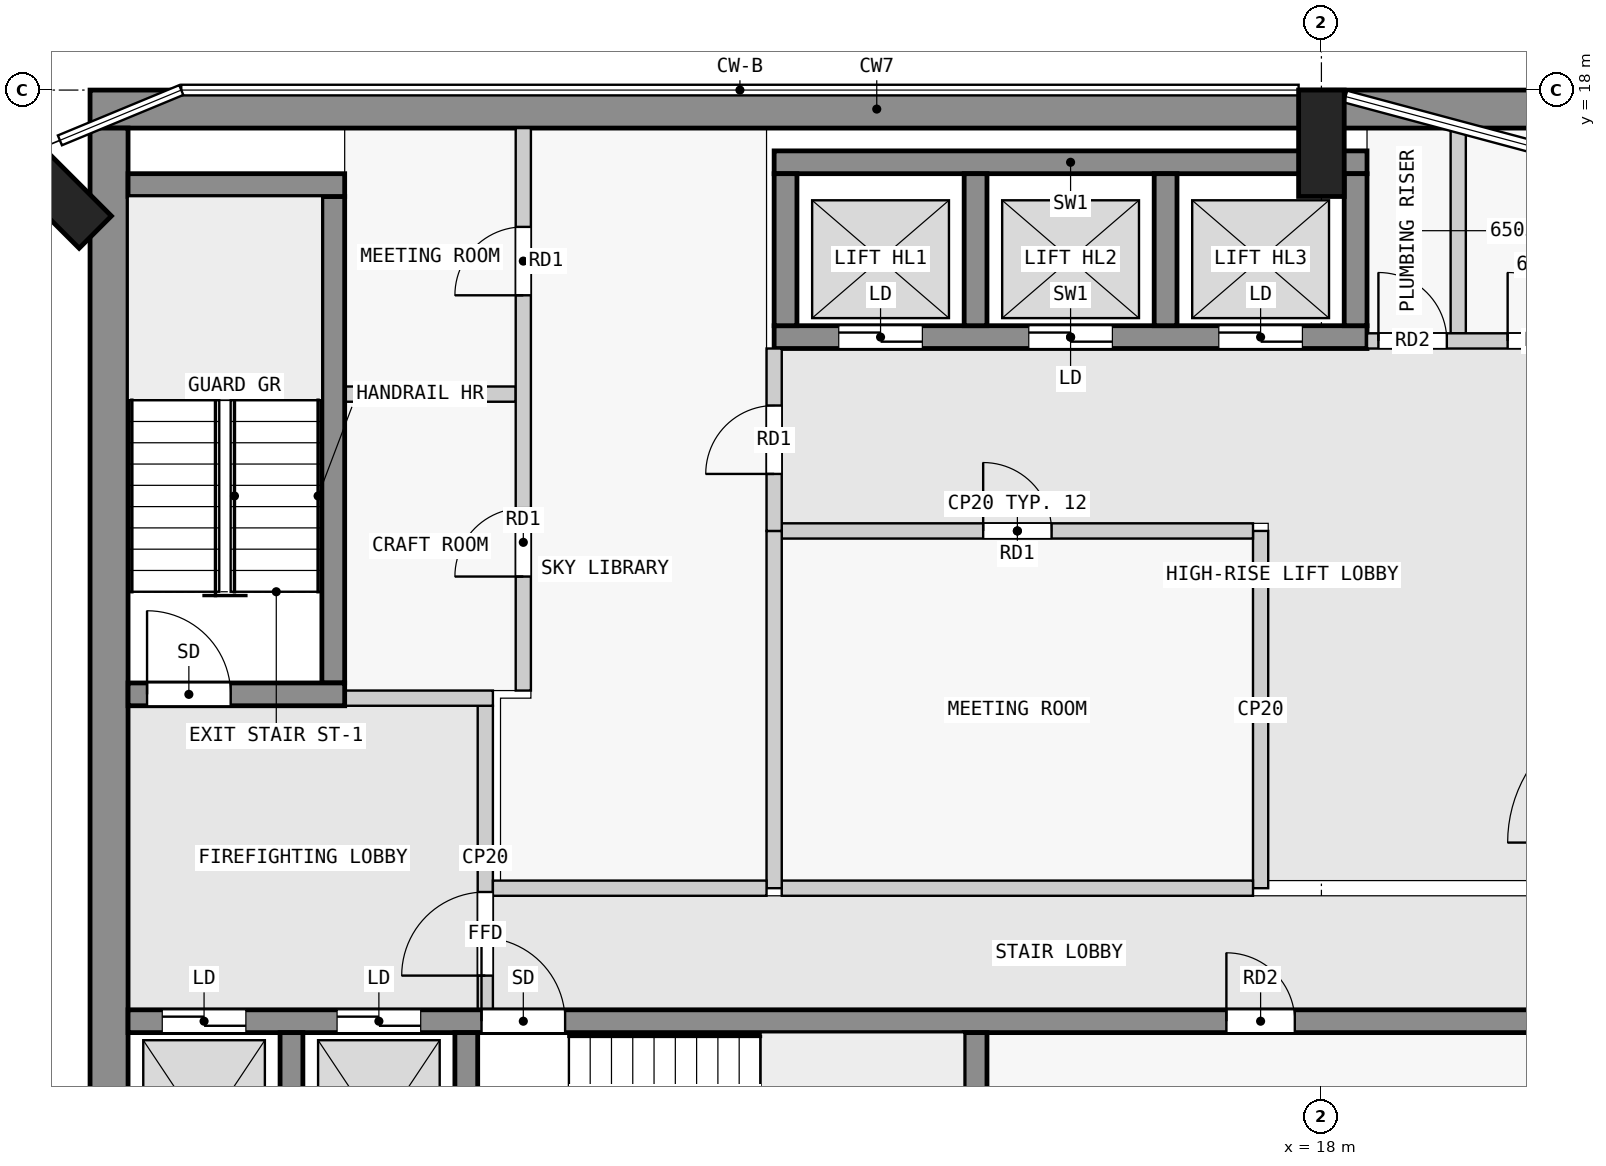
"""IFC4 building model, lengths in metres.
Left out: names, types, materials, properties, quantities, classifications, styles, units other than length and angle.
Written with IfcOpenShell. Run it as: python <this file> out.ifc"""

import sys

from ifc_helpers import new_model, si_unit, direction, frame, frame_2d, origin, origin_2d, place, context, subcontext, project, spatial, rectangle, extrude, element, fill, save


model = new_model("IFC4")
c1 = context("Model", 3, precision=1e-05, world=origin(), true_north=direction((0.0, 1.0)))
c2 = subcontext(c1, "Body", "Model", "MODEL_VIEW")
j1 = project(units=[si_unit("LENGTHUNIT", "METRE"), si_unit("PLANEANGLEUNIT", "RADIAN")], contexts=[c1])
p1 = place(None, origin())
s1 = spatial("IfcSite", under=j1, at=p1, CompositionType="ELEMENT")
p2 = place(p1, origin())
s2 = spatial("IfcBuilding", under=s1, at=p2, CompositionType="ELEMENT")
p3 = place(p2, frame((0.0, 0.0, 249.4)))
s3 = spatial("IfcBuildingStorey", under=s2, at=p3, CompositionType="ELEMENT", Elevation=249.4)
for number, where, z_axis, x_axis in (
    (1, (18.0, 17.3, 0.0), (0.0, 0.0, 1.0), (1.0, 0.0, 0.0)),
    (2, (1.374, 16.626, 0.0), (0.0, 0.0, 1.0), (0.707, 0.707, 0.0)),
):
    element("IfcColumn", number, at=place(p3, frame(where, z_axis=z_axis, x_axis=x_axis)), inside=s3, PredefinedType="COLUMN", context=c2, shape_type="SweptSolid", body=[
        extrude(rectangle(XDim=0.6, YDim=1.4, at=origin_2d()), origin(), (0.0, 0.0, 1.0), 3.5),
    ])
p4 = place(p3, frame((1.8, 17.75, 0.0), z_axis=(0.0, 0.0, 1.0), x_axis=(1.0, 0.0, 0.0)))
e3 = element("IfcWall", 3, at=p4, inside=s3, PredefinedType="SHEAR", context=c2, shape_type="SweptSolid", body=[
    extrude(rectangle(XDim=20.7, YDim=0.5, at=frame_2d((10.35, 0.0))), origin(), (0.0, 0.0, 1.0), 3.25),
])
p5 = place(p3, frame((2.05, 2.5, 0.0), z_axis=(0.0, 0.0, 1.0), x_axis=(0.0, 1.0, 0.0)))
e4 = element("IfcWall", 4, at=p5, inside=s3, PredefinedType="SHEAR", context=c2, shape_type="SweptSolid", body=[
    extrude(rectangle(XDim=15.0, YDim=0.5, at=frame_2d((7.5, 0.0))), origin(), (0.0, 0.0, 1.0), 3.25),
])
for number, where, z_axis, x_axis in (
    (5, (4.45, 2.8, 0.0), (0.0, 0.0, 1.0), (0.0, 1.0, 0.0)),
    (6, (6.75, 2.8, 0.0), (0.0, 0.0, 1.0), (0.0, 1.0, 0.0)),
    (7, (13.45, 2.8, 0.0), (0.0, 0.0, 1.0), (0.0, 1.0, 0.0)),
):
    element("IfcWall", number, at=place(p3, frame(where, z_axis=z_axis, x_axis=x_axis)), inside=s3, PredefinedType="SHEAR", context=c2, shape_type="SweptSolid", body=[
        extrude(rectangle(XDim=2.8, YDim=0.3, at=frame_2d((1.4, 0.0))), origin(), (0.0, 0.0, 1.0), 3.25),
    ])
p6 = place(p3, frame((2.3, 5.75, 0.0), z_axis=(0.0, 0.0, 1.0), x_axis=(1.0, 0.0, 0.0)))
e8 = element("IfcWall", 8, at=p6, inside=s3, PredefinedType="SHEAR", context=c2, shape_type="SweptSolid", body=[
    extrude(rectangle(XDim=18.8, YDim=0.3, at=frame_2d((9.4, 0.0))), origin(), (0.0, 0.0, 1.0), 3.25),
])
p7 = place(p6, frame((4.65, 0.0, 0.0)))
e9 = element("IfcOpeningElement", 9, at=p7, cuts=e8, PredefinedType="OPENING", context=c2, shape_type="SweptSolid", body=[
    extrude(rectangle(XDim=1.1, YDim=2.1, at=frame_2d((0.55, 1.05))), frame((0.0, 0.16, 0.0), z_axis=(0.0, -1.0, 0.0), x_axis=(1.0, 0.0, 0.0)), (0.0, 0.0, 1.0), 0.32),
])
p8 = place(p6, frame((0.45, 0.0, 0.0)))
e10 = element("IfcOpeningElement", 10, at=p8, cuts=e8, PredefinedType="OPENING", context=c2, shape_type="SweptSolid", body=[
    extrude(rectangle(XDim=1.1, YDim=2.1, at=frame_2d((0.55, 1.05))), frame((0.0, 0.16, 0.0), z_axis=(0.0, -1.0, 0.0), x_axis=(1.0, 0.0, 0.0)), (0.0, 0.0, 1.0), 0.32),
])
p9 = place(p6, frame((2.75, 0.0, 0.0)))
e11 = element("IfcOpeningElement", 11, at=p9, cuts=e8, PredefinedType="OPENING", context=c2, shape_type="SweptSolid", body=[
    extrude(rectangle(XDim=1.1, YDim=2.1, at=frame_2d((0.55, 1.05))), frame((0.0, 0.16, 0.0), z_axis=(0.0, -1.0, 0.0), x_axis=(1.0, 0.0, 0.0)), (0.0, 0.0, 1.0), 0.32),
])
p10 = place(p6, frame((14.45, 0.0, 0.0)))
e12 = element("IfcOpeningElement", 12, at=p10, cuts=e8, PredefinedType="OPENING", context=c2, shape_type="SweptSolid", body=[
    extrude(rectangle(XDim=0.9, YDim=2.1, at=frame_2d((0.45, 1.05))), frame((0.0, 0.16, 0.0), z_axis=(0.0, -1.0, 0.0), x_axis=(1.0, 0.0, 0.0)), (0.0, 0.0, 1.0), 0.32),
])
p11 = place(p3, frame((2.3, 10.05, 0.0), z_axis=(0.0, 0.0, 1.0), x_axis=(1.0, 0.0, 0.0)))
e13 = element("IfcWall", 13, at=p11, inside=s3, PredefinedType="SHEAR", context=c2, shape_type="SweptSolid", body=[
    extrude(rectangle(XDim=2.85, YDim=0.3, at=frame_2d((1.425, 0.0))), origin(), (0.0, 0.0, 1.0), 3.25),
])
p12 = place(p11, frame((0.25, 0.0, 0.0)))
e14 = element("IfcOpeningElement", 14, at=p12, cuts=e13, PredefinedType="OPENING", context=c2, shape_type="SweptSolid", body=[
    extrude(rectangle(XDim=1.1, YDim=2.1, at=frame_2d((0.55, 1.05))), frame((0.0, 0.16, 0.0), z_axis=(0.0, -1.0, 0.0), x_axis=(1.0, 0.0, 0.0)), (0.0, 0.0, 1.0), 0.32),
])
p13 = place(p3, frame((5.0, 10.2, 0.0), z_axis=(0.0, 0.0, 1.0), x_axis=(0.0, 1.0, 0.0)))
e15 = element("IfcWall", 15, at=p13, inside=s3, PredefinedType="SHEAR", context=c2, shape_type="SweptSolid", body=[
    extrude(rectangle(XDim=6.4, YDim=0.3, at=frame_2d((3.2, 0.0))), origin(), (0.0, 0.0, 1.0), 3.25),
])
p14 = place(p3, frame((2.3, 16.75, 0.0), z_axis=(0.0, 0.0, 1.0), x_axis=(1.0, 0.0, 0.0)))
e16 = element("IfcWall", 16, at=p14, inside=s3, PredefinedType="SHEAR", context=c2, shape_type="SweptSolid", body=[
    extrude(rectangle(XDim=2.85, YDim=0.3, at=frame_2d((1.425, 0.0))), origin(), (0.0, 0.0, 1.0), 3.25),
])
p15 = place(p3, frame((10.8, 17.05, 0.0), z_axis=(0.0, 0.0, 1.0), x_axis=(1.0, 0.0, 0.0)))
e17 = element("IfcWall", 17, at=p15, inside=s3, PredefinedType="SHEAR", context=c2, shape_type="SweptSolid", body=[
    extrude(rectangle(XDim=7.8, YDim=0.3, at=frame_2d((3.9, 0.0))), origin(), (0.0, 0.0, 1.0), 3.25),
])
p16 = place(p3, frame((10.8, 14.75, 0.0), z_axis=(0.0, 0.0, 1.0), x_axis=(1.0, 0.0, 0.0)))
e18 = element("IfcWall", 18, at=p16, inside=s3, PredefinedType="SHEAR", context=c2, shape_type="SweptSolid", body=[
    extrude(rectangle(XDim=7.8, YDim=0.3, at=frame_2d((3.9, 0.0))), origin(), (0.0, 0.0, 1.0), 3.25),
])
p17 = place(p16, frame((0.85, 0.0, 0.0)))
e19 = element("IfcOpeningElement", 19, at=p17, cuts=e18, PredefinedType="OPENING", context=c2, shape_type="SweptSolid", body=[
    extrude(rectangle(XDim=1.1, YDim=2.1, at=frame_2d((0.55, 1.05))), frame((0.0, 0.16, 0.0), z_axis=(0.0, -1.0, 0.0), x_axis=(1.0, 0.0, 0.0)), (0.0, 0.0, 1.0), 0.32),
])
p18 = place(p16, frame((3.35, 0.0, 0.0)))
e20 = element("IfcOpeningElement", 20, at=p18, cuts=e18, PredefinedType="OPENING", context=c2, shape_type="SweptSolid", body=[
    extrude(rectangle(XDim=1.1, YDim=2.1, at=frame_2d((0.55, 1.05))), frame((0.0, 0.16, 0.0), z_axis=(0.0, -1.0, 0.0), x_axis=(1.0, 0.0, 0.0)), (0.0, 0.0, 1.0), 0.32),
])
p19 = place(p16, frame((5.85, 0.0, 0.0)))
e21 = element("IfcOpeningElement", 21, at=p19, cuts=e18, PredefinedType="OPENING", context=c2, shape_type="SweptSolid", body=[
    extrude(rectangle(XDim=1.1, YDim=2.1, at=frame_2d((0.55, 1.05))), frame((0.0, 0.16, 0.0), z_axis=(0.0, -1.0, 0.0), x_axis=(1.0, 0.0, 0.0)), (0.0, 0.0, 1.0), 0.32),
])
for number, where, z_axis, x_axis in (
    (22, (10.95, 14.9, 0.0), (0.0, 0.0, 1.0), (0.0, 1.0, 0.0)),
    (23, (13.45, 14.9, 0.0), (0.0, 0.0, 1.0), (0.0, 1.0, 0.0)),
    (24, (15.95, 14.9, 0.0), (0.0, 0.0, 1.0), (0.0, 1.0, 0.0)),
    (25, (18.45, 14.9, 0.0), (0.0, 0.0, 1.0), (0.0, 1.0, 0.0)),
):
    element("IfcWall", number, at=place(p3, frame(where, z_axis=z_axis, x_axis=x_axis)), inside=s3, PredefinedType="SHEAR", context=c2, shape_type="SweptSolid", body=[
        extrude(rectangle(XDim=2.0, YDim=0.3, at=frame_2d((1.0, 0.0))), origin(), (0.0, 0.0, 1.0), 3.25),
    ])
p20 = place(p3, frame((7.0, 5.9, 0.0), z_axis=(0.0, 0.0, 1.0), x_axis=(0.0, 1.0, 0.0)))
e26 = element("IfcWall", 26, at=p20, inside=s3, PredefinedType="PARTITIONING", context=c2, shape_type="SweptSolid", body=[
    extrude(rectangle(XDim=4.0, YDim=0.2, at=frame_2d((2.0, 0.0))), origin(), (0.0, 0.0, 1.0), 3.25),
])
p21 = place(p20, frame((0.45, 0.0, 0.0)))
e27 = element("IfcOpeningElement", 27, at=p21, cuts=e26, PredefinedType="OPENING", context=c2, shape_type="SweptSolid", body=[
    extrude(rectangle(XDim=1.1, YDim=2.1, at=frame_2d((0.55, 1.05))), frame((0.0, 0.11, 0.0), z_axis=(0.0, -1.0, 0.0), x_axis=(1.0, 0.0, 0.0)), (0.0, 0.0, 1.0), 0.22),
])
p22 = place(p3, frame((5.15, 10.0, 0.0), z_axis=(0.0, 0.0, 1.0), x_axis=(1.0, 0.0, 0.0)))
e28 = element("IfcWall", 28, at=p22, inside=s3, PredefinedType="PARTITIONING", context=c2, shape_type="SweptSolid", body=[
    extrude(rectangle(XDim=1.95, YDim=0.2, at=frame_2d((0.975, 0.0))), origin(), (0.0, 0.0, 1.0), 3.25),
])
p23 = place(p3, frame((7.1, 7.5, 0.0), z_axis=(0.0, 0.0, 1.0), x_axis=(1.0, 0.0, 0.0)))
e29 = element("IfcWall", 29, at=p23, inside=s3, PredefinedType="PARTITIONING", context=c2, shape_type="SweptSolid", body=[
    extrude(rectangle(XDim=3.6, YDim=0.2, at=frame_2d((1.8, 0.0))), origin(), (0.0, 0.0, 1.0), 3.25),
])
p24 = place(p3, frame((10.8, 12.2, 0.0), z_axis=(0.0, 0.0, 1.0), x_axis=(0.0, 1.0, 0.0)))
e30 = element("IfcWall", 30, at=p24, inside=s3, PredefinedType="PARTITIONING", context=c2, shape_type="SweptSolid", body=[
    extrude(rectangle(XDim=2.4, YDim=0.2, at=frame_2d((1.2, 0.0))), origin(), (0.0, 0.0, 1.0), 3.25),
])
p25 = place(p24, frame((0.75, 0.0, 0.0)))
e31 = element("IfcOpeningElement", 31, at=p25, cuts=e30, PredefinedType="OPENING", context=c2, shape_type="SweptSolid", body=[
    extrude(rectangle(XDim=0.9, YDim=2.1, at=frame_2d((0.45, 1.05))), frame((0.0, 0.11, 0.0), z_axis=(0.0, -1.0, 0.0), x_axis=(1.0, 0.0, 0.0)), (0.0, 0.0, 1.0), 0.22),
])
p26 = place(p3, frame((10.8, 7.5, 0.0), z_axis=(0.0, 0.0, 1.0), x_axis=(0.0, 1.0, 0.0)))
e32 = element("IfcWall", 32, at=p26, inside=s3, PredefinedType="PARTITIONING", context=c2, shape_type="SweptSolid", body=[
    extrude(rectangle(XDim=4.7, YDim=0.2, at=frame_2d((2.35, 0.0))), origin(), (0.0, 0.0, 1.0), 3.25),
])
p27 = place(p3, frame((10.9, 7.5, 0.0), z_axis=(0.0, 0.0, 1.0), x_axis=(1.0, 0.0, 0.0)))
e33 = element("IfcWall", 33, at=p27, inside=s3, PredefinedType="PARTITIONING", context=c2, shape_type="SweptSolid", body=[
    extrude(rectangle(XDim=6.2, YDim=0.2, at=frame_2d((3.1, 0.0))), origin(), (0.0, 0.0, 1.0), 3.25),
])
p28 = place(p3, frame((17.2, 7.5, 0.0), z_axis=(0.0, 0.0, 1.0), x_axis=(0.0, 1.0, 0.0)))
e34 = element("IfcWall", 34, at=p28, inside=s3, PredefinedType="PARTITIONING", context=c2, shape_type="SweptSolid", body=[
    extrude(rectangle(XDim=4.7, YDim=0.2, at=frame_2d((2.35, 0.0))), origin(), (0.0, 0.0, 1.0), 3.25),
])
p29 = place(p3, frame((10.9, 12.2, 0.0), z_axis=(0.0, 0.0, 1.0), x_axis=(1.0, 0.0, 0.0)))
e35 = element("IfcWall", 35, at=p29, inside=s3, PredefinedType="PARTITIONING", context=c2, shape_type="SweptSolid", body=[
    extrude(rectangle(XDim=6.2, YDim=0.2, at=frame_2d((3.1, 0.0))), origin(), (0.0, 0.0, 1.0), 3.25),
])
p30 = place(p29, frame((2.65, 0.0, 0.0)))
e36 = element("IfcOpeningElement", 36, at=p30, cuts=e35, PredefinedType="OPENING", context=c2, shape_type="SweptSolid", body=[
    extrude(rectangle(XDim=0.9, YDim=2.1, at=frame_2d((0.45, 1.05))), frame((0.0, 0.11, 0.0), z_axis=(0.0, -1.0, 0.0), x_axis=(1.0, 0.0, 0.0)), (0.0, 0.0, 1.0), 0.22),
])
p31 = place(p3, frame((7.5, 10.1, 0.0), z_axis=(0.0, 0.0, 1.0), x_axis=(0.0, 1.0, 0.0)))
e37 = element("IfcWall", 37, at=p31, inside=s3, PredefinedType="PARTITIONING", context=c2, shape_type="SweptSolid", body=[
    extrude(rectangle(XDim=7.4, YDim=0.2, at=frame_2d((3.7, 0.0))), origin(), (0.0, 0.0, 1.0), 3.25),
])
p32 = place(p31, frame((1.5, 0.0, 0.0)))
e38 = element("IfcOpeningElement", 38, at=p32, cuts=e37, PredefinedType="OPENING", context=c2, shape_type="SweptSolid", body=[
    extrude(rectangle(XDim=0.9, YDim=2.1, at=frame_2d((0.45, 1.05))), frame((0.0, 0.11, 0.0), z_axis=(0.0, -1.0, 0.0), x_axis=(1.0, 0.0, 0.0)), (0.0, 0.0, 1.0), 0.22),
])
p33 = place(p31, frame((5.2, 0.0, 0.0)))
e39 = element("IfcOpeningElement", 39, at=p33, cuts=e37, PredefinedType="OPENING", context=c2, shape_type="SweptSolid", body=[
    extrude(rectangle(XDim=0.9, YDim=2.1, at=frame_2d((0.45, 1.05))), frame((0.0, 0.11, 0.0), z_axis=(0.0, -1.0, 0.0), x_axis=(1.0, 0.0, 0.0)), (0.0, 0.0, 1.0), 0.22),
])
p34 = place(p3, frame((5.15, 14.0, 0.0), z_axis=(0.0, 0.0, 1.0), x_axis=(1.0, 0.0, 0.0)))
e40 = element("IfcWall", 40, at=p34, inside=s3, PredefinedType="PARTITIONING", context=c2, shape_type="SweptSolid", body=[
    extrude(rectangle(XDim=2.25, YDim=0.2, at=frame_2d((1.125, 0.0))), origin(), (0.0, 0.0, 1.0), 3.25),
])
p35 = place(p3, frame((18.6, 14.7, 0.0), z_axis=(0.0, 0.0, 1.0), x_axis=(1.0, 0.0, 0.0)))
e41 = element("IfcWall", 41, at=p35, inside=s3, PredefinedType="PARTITIONING", context=c2, shape_type="SweptSolid", body=[
    extrude(rectangle(XDim=3.4, YDim=0.2, at=frame_2d((1.7, 0.0))), origin(), (0.0, 0.0, 1.0), 3.25),
])
p36 = place(p35, frame((0.15, 0.0, 0.0)))
e42 = element("IfcOpeningElement", 42, at=p36, cuts=e41, PredefinedType="OPENING", context=c2, shape_type="SweptSolid", body=[
    extrude(rectangle(XDim=0.9, YDim=2.1, at=frame_2d((0.45, 1.05))), frame((0.0, 0.11, 0.0), z_axis=(0.0, -1.0, 0.0), x_axis=(1.0, 0.0, 0.0)), (0.0, 0.0, 1.0), 0.22),
])
p37 = place(p35, frame((1.85, 0.0, 0.0)))
e43 = element("IfcOpeningElement", 43, at=p37, cuts=e41, PredefinedType="OPENING", context=c2, shape_type="SweptSolid", body=[
    extrude(rectangle(XDim=0.9, YDim=2.1, at=frame_2d((0.45, 1.05))), frame((0.0, 0.11, 0.0), z_axis=(0.0, -1.0, 0.0), x_axis=(1.0, 0.0, 0.0)), (0.0, 0.0, 1.0), 0.22),
])
p38 = place(p3, frame((19.8, 14.8, 0.0), z_axis=(0.0, 0.0, 1.0), x_axis=(0.0, 1.0, 0.0)))
e44 = element("IfcWall", 44, at=p38, inside=s3, PredefinedType="PARTITIONING", context=c2, shape_type="SweptSolid", body=[
    extrude(rectangle(XDim=2.7, YDim=0.2, at=frame_2d((1.35, 0.0))), origin(), (0.0, 0.0, 1.0), 3.25),
])
p39 = place(p21, origin())
e45 = element("IfcDoor", 45, at=p39, inside=s3, OperationType="SINGLE_SWING_LEFT", PredefinedType="DOOR", context=c2, shape_type="SweptSolid", body=[
    extrude(rectangle(XDim=1.1, YDim=2.1, at=frame_2d((0.55, 1.05))), frame((0.0, 0.025, 0.0), z_axis=(0.0, -1.0, 0.0), x_axis=(1.0, 0.0, 0.0)), (0.0, 0.0, 1.0), 0.05),
])
fill(e27, e45)
p40 = place(p12, origin())
e46 = element("IfcDoor", 46, at=p40, inside=s3, OperationType="SINGLE_SWING_RIGHT", PredefinedType="DOOR", context=c2, shape_type="SweptSolid", body=[
    extrude(rectangle(XDim=1.1, YDim=2.1, at=frame_2d((0.55, 1.05))), frame((0.0, 0.025, 0.0), z_axis=(0.0, -1.0, 0.0), x_axis=(1.0, 0.0, 0.0)), (0.0, 0.0, 1.0), 0.05),
])
fill(e14, e46)
p41 = place(p25, origin())
e47 = element("IfcDoor", 47, at=p41, inside=s3, OperationType="SINGLE_SWING_LEFT", PredefinedType="DOOR", context=c2, shape_type="SweptSolid", body=[
    extrude(rectangle(XDim=0.9, YDim=2.1, at=frame_2d((0.45, 1.05))), frame((0.0, 0.025, 0.0), z_axis=(0.0, -1.0, 0.0), x_axis=(1.0, 0.0, 0.0)), (0.0, 0.0, 1.0), 0.05),
])
fill(e31, e47)
p42 = place(p30, origin())
e48 = element("IfcDoor", 48, at=p42, inside=s3, OperationType="SINGLE_SWING_LEFT", PredefinedType="DOOR", context=c2, shape_type="SweptSolid", body=[
    extrude(rectangle(XDim=0.9, YDim=2.1, at=frame_2d((0.45, 1.05))), frame((0.0, 0.025, 0.0), z_axis=(0.0, -1.0, 0.0), x_axis=(1.0, 0.0, 0.0)), (0.0, 0.0, 1.0), 0.05),
])
fill(e36, e48)
p43 = place(p7, origin())
e49 = element("IfcDoor", 49, at=p43, inside=s3, OperationType="SINGLE_SWING_LEFT", PredefinedType="DOOR", context=c2, shape_type="SweptSolid", body=[
    extrude(rectangle(XDim=1.1, YDim=2.1, at=frame_2d((0.55, 1.05))), frame((0.0, 0.025, 0.0), z_axis=(0.0, -1.0, 0.0), x_axis=(1.0, 0.0, 0.0)), (0.0, 0.0, 1.0), 0.05),
])
fill(e9, e49)
p44 = place(p8, origin())
e50 = element("IfcDoor", 50, at=p44, inside=s3, OperationType="DOUBLE_DOOR_SLIDING", PredefinedType="DOOR", context=c2, shape_type="SweptSolid", body=[
    extrude(rectangle(XDim=1.1, YDim=2.1, at=frame_2d((0.55, 1.05))), frame((0.0, 0.025, 0.0), z_axis=(0.0, -1.0, 0.0), x_axis=(1.0, 0.0, 0.0)), (0.0, 0.0, 1.0), 0.05),
])
fill(e10, e50)
p45 = place(p9, origin())
e51 = element("IfcDoor", 51, at=p45, inside=s3, OperationType="DOUBLE_DOOR_SLIDING", PredefinedType="DOOR", context=c2, shape_type="SweptSolid", body=[
    extrude(rectangle(XDim=1.1, YDim=2.1, at=frame_2d((0.55, 1.05))), frame((0.0, 0.025, 0.0), z_axis=(0.0, -1.0, 0.0), x_axis=(1.0, 0.0, 0.0)), (0.0, 0.0, 1.0), 0.05),
])
fill(e11, e51)
p46 = place(p17, origin())
e52 = element("IfcDoor", 52, at=p46, inside=s3, OperationType="DOUBLE_DOOR_SLIDING", PredefinedType="DOOR", context=c2, shape_type="SweptSolid", body=[
    extrude(rectangle(XDim=1.1, YDim=2.1, at=frame_2d((0.55, 1.05))), frame((0.0, 0.025, 0.0), z_axis=(0.0, -1.0, 0.0), x_axis=(1.0, 0.0, 0.0)), (0.0, 0.0, 1.0), 0.05),
])
fill(e19, e52)
p47 = place(p18, origin())
e53 = element("IfcDoor", 53, at=p47, inside=s3, OperationType="DOUBLE_DOOR_SLIDING", PredefinedType="DOOR", context=c2, shape_type="SweptSolid", body=[
    extrude(rectangle(XDim=1.1, YDim=2.1, at=frame_2d((0.55, 1.05))), frame((0.0, 0.025, 0.0), z_axis=(0.0, -1.0, 0.0), x_axis=(1.0, 0.0, 0.0)), (0.0, 0.0, 1.0), 0.05),
])
fill(e20, e53)
p48 = place(p19, origin())
e54 = element("IfcDoor", 54, at=p48, inside=s3, OperationType="DOUBLE_DOOR_SLIDING", PredefinedType="DOOR", context=c2, shape_type="SweptSolid", body=[
    extrude(rectangle(XDim=1.1, YDim=2.1, at=frame_2d((0.55, 1.05))), frame((0.0, 0.025, 0.0), z_axis=(0.0, -1.0, 0.0), x_axis=(1.0, 0.0, 0.0)), (0.0, 0.0, 1.0), 0.05),
])
fill(e21, e54)
p49 = place(p32, origin())
e55 = element("IfcDoor", 55, at=p49, inside=s3, OperationType="SINGLE_SWING_RIGHT", PredefinedType="DOOR", context=c2, shape_type="SweptSolid", body=[
    extrude(rectangle(XDim=0.9, YDim=2.1, at=frame_2d((0.45, 1.05))), frame((0.0, 0.025, 0.0), z_axis=(0.0, -1.0, 0.0), x_axis=(1.0, 0.0, 0.0)), (0.0, 0.0, 1.0), 0.05),
])
fill(e38, e55)
p50 = place(p33, origin())
e56 = element("IfcDoor", 56, at=p50, inside=s3, OperationType="SINGLE_SWING_RIGHT", PredefinedType="DOOR", context=c2, shape_type="SweptSolid", body=[
    extrude(rectangle(XDim=0.9, YDim=2.1, at=frame_2d((0.45, 1.05))), frame((0.0, 0.025, 0.0), z_axis=(0.0, -1.0, 0.0), x_axis=(1.0, 0.0, 0.0)), (0.0, 0.0, 1.0), 0.05),
])
fill(e39, e56)
p51 = place(p36, origin())
e57 = element("IfcDoor", 57, at=p51, inside=s3, OperationType="SINGLE_SWING_LEFT", PredefinedType="DOOR", context=c2, shape_type="SweptSolid", body=[
    extrude(rectangle(XDim=0.9, YDim=2.1, at=frame_2d((0.45, 1.05))), frame((0.0, 0.025, 0.0), z_axis=(0.0, -1.0, 0.0), x_axis=(1.0, 0.0, 0.0)), (0.0, 0.0, 1.0), 0.05),
])
fill(e42, e57)
p52 = place(p37, origin())
e58 = element("IfcDoor", 58, at=p52, inside=s3, OperationType="SINGLE_SWING_LEFT", PredefinedType="DOOR", context=c2, shape_type="SweptSolid", body=[
    extrude(rectangle(XDim=0.9, YDim=2.1, at=frame_2d((0.45, 1.05))), frame((0.0, 0.025, 0.0), z_axis=(0.0, -1.0, 0.0), x_axis=(1.0, 0.0, 0.0)), (0.0, 0.0, 1.0), 0.05),
])
fill(e43, e58)
p53 = place(p10, origin())
e59 = element("IfcDoor", 59, at=p53, inside=s3, OperationType="SINGLE_SWING_LEFT", PredefinedType="DOOR", context=c2, shape_type="SweptSolid", body=[
    extrude(rectangle(XDim=0.9, YDim=2.1, at=frame_2d((0.45, 1.05))), frame((0.0, 0.025, 0.0), z_axis=(0.0, -1.0, 0.0), x_axis=(1.0, 0.0, 0.0)), (0.0, 0.0, 1.0), 0.05),
])
fill(e12, e59)
save(model, sys.argv[1])
